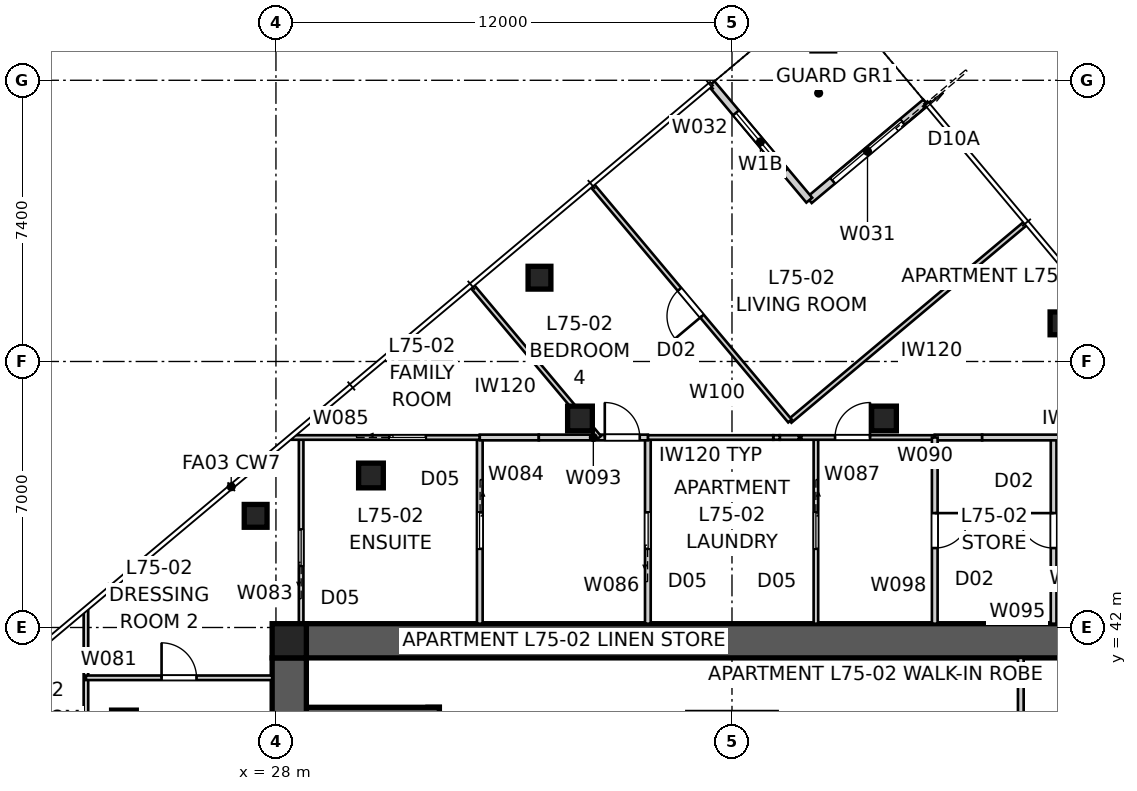
"""IFC4 building model, lengths in metres.
Left out: names, types, materials, properties, quantities, classifications, styles, units other than length and angle.
Written with IfcOpenShell. Run it as: python <this file> out.ifc"""

import sys

from ifc_helpers import new_model, si_unit, direction, frame, frame_2d, origin, origin_2d, place, context, subcontext, project, spatial, polyline, rectangle, outline, extrude, element, fill, save


model = new_model("IFC4")
c1 = context("Model", 3, precision=1e-05, world=origin(), true_north=direction((0.0, 1.0)))
c2 = subcontext(c1, "Body", "Model", "MODEL_VIEW")
j1 = project(units=[si_unit("LENGTHUNIT", "METRE"), si_unit("PLANEANGLEUNIT", "RADIAN")], contexts=[c1])
p1 = place(None, origin())
s1 = spatial("IfcSite", under=j1, at=p1, CompositionType="ELEMENT")
p2 = place(p1, origin())
s2 = spatial("IfcBuilding", under=s1, at=p2, CompositionType="ELEMENT")
p3 = place(p2, frame((0.0, 0.0, 272.6)))
s3 = spatial("IfcBuildingStorey", under=s2, at=p3, CompositionType="ELEMENT", Elevation=272.6)
p4 = place(p3, frame((28.8, 41.65, 0.0), z_axis=(0.0, 0.0, 1.0), x_axis=(1.0, 0.0, 0.0)))
e1 = element("IfcWall", 1, at=p4, inside=s3, PredefinedType="SHEAR", context=c2, shape_type="SweptSolid", body=[
    extrude(outline(polyline([(0.0, -0.45), (22.4, -0.45), (22.4, -0.025), (22.85, -0.025), (22.85, 0.025), (22.4, 0.025), (22.4, 0.45), (0.0, 0.45), (0.0, 0.025), (-0.45, 0.025), (-0.45, -0.025), (0.0, -0.025), (0.0, -0.45)])), origin(), (0.0, 0.0, 1.0), 3.4),
])
p5 = place(p3, frame((28.35, 41.2, 0.0), z_axis=(0.0, 0.0, 1.0), x_axis=(0.0, -1.0, 0.0)))
e2 = element("IfcWall", 2, at=p5, inside=s3, PredefinedType="SHEAR", context=c2, shape_type="SweptSolid", body=[
    extrude(outline(polyline([(0.0, -0.45), (22.4, -0.45), (22.4, -0.025), (22.85, -0.025), (22.85, 0.025), (22.4, 0.025), (22.4, 0.45), (0.0, 0.45), (0.0, 0.025), (-0.45, 0.025), (-0.45, -0.025), (0.0, -0.025), (0.0, -0.45)])), origin(), (0.0, 0.0, 1.0), 3.4),
])
p6 = place(p5, frame((11.14, 0.0, 0.0)))
e3 = element("IfcOpeningElement", 3, at=p6, cuts=e2, PredefinedType="OPENING", context=c2, shape_type="SweptSolid", body=[
    extrude(rectangle(XDim=1.02, YDim=2.4, at=frame_2d((0.51, 1.2))), frame((0.0, 0.46, 0.0), z_axis=(0.0, -1.0, 0.0), x_axis=(1.0, 0.0, 0.0)), (0.0, 0.0, 1.0), 0.92),
])
p7 = place(p3, frame((32.15, 32.2, 0.0), z_axis=(0.0, 0.0, 1.0), x_axis=(0.0, 1.0, 0.0)))
e4 = element("IfcWall", 4, at=p7, inside=s3, PredefinedType="SHEAR", context=c2, shape_type="SweptSolid", body=[
    extrude(rectangle(XDim=7.7, YDim=0.3, at=frame_2d((3.85, 0.0))), origin(), (0.0, 0.0, 1.0), 3.4),
])
p8 = place(p3, frame((28.8, 39.75, 0.0), z_axis=(0.0, 0.0, 1.0), x_axis=(1.0, 0.0, 0.0)))
e5 = element("IfcWall", 5, at=p8, inside=s3, PredefinedType="SHEAR", context=c2, shape_type="SweptSolid", body=[
    extrude(rectangle(XDim=3.5, YDim=0.3, at=frame_2d((1.75, 0.0))), origin(), (0.0, 0.0, 1.0), 3.4),
])
p9 = place(p3, frame((38.8, 39.7, 0.0), z_axis=(0.0, 0.0, 1.0), x_axis=(1.0, 0.0, 0.0)))
e6 = element("IfcWall", 6, at=p9, inside=s3, PredefinedType="SOLIDWALL", context=c2, shape_type="SweptSolid", body=[
    extrude(rectangle(XDim=2.4, YDim=0.2, at=frame_2d((1.2, 0.0))), origin(), (0.0, 0.0, 1.0), 3.4),
])
p10 = place(p3, frame((28.35, 41.65, 0.0), z_axis=(0.0, 0.0, 1.0), x_axis=(1.0, 0.0, 0.0)))
e7 = element("IfcColumn", 7, at=p10, inside=s3, PredefinedType="COLUMN", context=c2, shape_type="SweptSolid", body=[
    extrude(rectangle(XDim=0.9, YDim=0.9, at=origin_2d()), origin(), (0.0, 0.0, 1.0), 3.4),
])
for number, where, z_axis, x_axis in (
    (8, (48.671, 50.003, -0.15), (0.0, 0.0, 1.0), (1.0, 0.0, 0.0)),
    (9, (34.935, 51.205, -0.15), (0.0, 0.0, 1.0), (1.0, 0.0, 0.0)),
    (10, (27.466, 44.938, -0.15), (0.0, 0.0, 1.0), (1.0, 0.0, 0.0)),
):
    element("IfcColumn", number, at=place(p3, frame(where, z_axis=z_axis, x_axis=x_axis)), inside=s3, PredefinedType="COLUMN", context=c2, shape_type="SweptSolid", body=[
        extrude(rectangle(XDim=0.6, YDim=0.6, at=origin_2d()), origin(), (0.0, 0.0, 1.0), 3.55),
    ])
for number, where, z_axis, x_axis in (
    (11, (44.0, 47.5, 0.0), (0.0, 0.0, 1.0), (1.0, 0.0, 0.0)),
    (12, (36.0, 47.5, 0.0), (0.0, 0.0, 1.0), (1.0, 0.0, 0.0)),
    (13, (30.5, 46.0, 0.0), (0.0, 0.0, 1.0), (1.0, 0.0, 0.0)),
    (14, (24.0, 39.5, 0.0), (0.0, 0.0, 1.0), (1.0, 0.0, 0.0)),
):
    element("IfcColumn", number, at=place(p3, frame(where, z_axis=z_axis, x_axis=x_axis)), inside=s3, PredefinedType="COLUMN", context=c2, shape_type="SweptSolid", body=[
        extrude(rectangle(XDim=0.65, YDim=0.65, at=origin_2d()), origin(), (0.0, 0.0, 1.0), 3.4),
    ])
p11 = place(p3, frame((45.098, 55.817, 0.0), z_axis=(0.0, 0.0, 1.0), x_axis=(-0.766060656284, -0.642768287094, 0.0)))
e15 = element("IfcWall", 15, at=p11, inside=s3, PredefinedType="SOLIDWALL", context=c2, shape_type="SweptSolid", body=[
    extrude(rectangle(XDim=4.0, YDim=0.2, at=frame_2d((2.0, 0.0))), origin(), (0.0, 0.0, 1.0), 3.25),
])
p12 = place(p11, frame((0.8, 0.0, 0.0)))
e16 = element("IfcOpeningElement", 16, at=p12, cuts=e15, PredefinedType="OPENING", context=c2, shape_type="SweptSolid", body=[
    extrude(rectangle(XDim=2.4, YDim=2.1, at=frame_2d((1.2, 1.05))), frame((0.0, 0.11, 0.0), z_axis=(0.0, -1.0, 0.0), x_axis=(1.0, 0.0, 0.0)), (0.0, 0.0, 1.0), 0.22),
])
p13 = place(p3, frame((42.034, 53.246, 0.0), z_axis=(0.0, 0.0, 1.0), x_axis=(-0.642798342015, 0.766035437498, 0.0)))
e17 = element("IfcWall", 17, at=p13, inside=s3, PredefinedType="SOLIDWALL", context=c2, shape_type="SweptSolid", body=[
    extrude(rectangle(XDim=4.0, YDim=0.2, at=frame_2d((2.0, 0.0))), origin(), (0.0, 0.0, 1.0), 3.25),
])
p14 = place(p13, frame((1.0, 0.0, 0.45)))
e18 = element("IfcOpeningElement", 18, at=p14, cuts=e17, PredefinedType="OPENING", context=c2, shape_type="SweptSolid", body=[
    extrude(rectangle(XDim=2.0, YDim=1.8, at=frame_2d((1.0, 0.9))), frame((0.0, 0.11, 0.0), z_axis=(0.0, -1.0, 0.0), x_axis=(1.0, 0.0, 0.0)), (0.0, 0.0, 1.0), 0.22),
])
p15 = place(p3, frame((47.6, 41.2, 0.0), z_axis=(0.0, 0.0, 1.0), x_axis=(0.0, -1.0, 0.0)))
e19 = element("IfcWall", 19, at=p15, inside=s3, PredefinedType="SOLIDWALL", context=c2, shape_type="SweptSolid", body=[
    extrude(rectangle(XDim=5.9, YDim=0.15, at=frame_2d((2.95, 0.0))), origin(), (0.0, 0.0, 1.0), 3.25),
])
p16 = place(p3, frame((23.0, 31.824, 0.0), z_axis=(0.0, 0.0, 1.0), x_axis=(0.0, 1.0, 0.0)))
e20 = element("IfcWall", 20, at=p16, inside=s3, PredefinedType="PARTITIONING", context=c2, shape_type="SweptSolid", body=[
    extrude(rectangle(XDim=10.619, YDim=0.12, at=frame_2d((5.31, 0.0))), origin(), (0.0, 0.0, 1.0), 2.55),
])
p17 = place(p16, frame((0.844, 0.0, 0.0)))
e21 = element("IfcOpeningElement", 21, at=p17, cuts=e20, PredefinedType="OPENING", context=c2, shape_type="SweptSolid", body=[
    extrude(rectangle(XDim=0.92, YDim=2.34, at=frame_2d((0.46, 1.17))), frame((0.0, 0.07, 0.0), z_axis=(0.0, -1.0, 0.0), x_axis=(1.0, 0.0, 0.0)), (0.0, 0.0, 1.0), 0.14),
])
p18 = place(p3, frame((23.0, 40.676, 0.0), z_axis=(0.0, 0.0, 1.0), x_axis=(1.0, 0.0, 0.0)))
e22 = element("IfcWall", 22, at=p18, inside=s3, PredefinedType="PARTITIONING", context=c2, shape_type="SweptSolid", body=[
    extrude(rectangle(XDim=4.9, YDim=0.12, at=frame_2d((2.45, 0.0))), origin(), (0.0, 0.0, 1.0), 3.25),
])
p19 = place(p18, frame((1.99, 0.0, 0.0)))
e23 = element("IfcOpeningElement", 23, at=p19, cuts=e22, PredefinedType="OPENING", context=c2, shape_type="SweptSolid", body=[
    extrude(rectangle(XDim=0.92, YDim=2.1, at=frame_2d((0.46, 1.05))), frame((0.0, 0.07, 0.0), z_axis=(0.0, -1.0, 0.0), x_axis=(1.0, 0.0, 0.0)), (0.0, 0.0, 1.0), 0.14),
])
p20 = place(p3, frame((28.663, 41.18, 0.0), z_axis=(0.0, 0.0, 1.0), x_axis=(0.0, 1.0, 0.0)))
e24 = element("IfcWall", 24, at=p20, inside=s3, PredefinedType="PARTITIONING", context=c2, shape_type="SweptSolid", body=[
    extrude(rectangle(XDim=5.82, YDim=0.12, at=frame_2d((2.91, 0.0))), origin(), (0.0, 0.0, 1.0), 3.25),
])
p21 = place(p20, frame((2.44, 0.0, 0.0)))
e25 = element("IfcOpeningElement", 25, at=p21, cuts=e24, PredefinedType="OPENING", context=c2, shape_type="SweptSolid", body=[
    extrude(rectangle(XDim=0.96, YDim=2.1, at=frame_2d((0.48, 1.05))), frame((0.0, 0.07, 0.0), z_axis=(0.0, -1.0, 0.0), x_axis=(1.0, 0.0, 0.0)), (0.0, 0.0, 1.0), 0.14),
])
p22 = place(p3, frame((33.364, 47.0, 0.0), z_axis=(0.0, 0.0, 1.0), x_axis=(0.0, -1.0, 0.0)))
e26 = element("IfcWall", 26, at=p22, inside=s3, PredefinedType="SOLIDWALL", context=c2, shape_type="SweptSolid", body=[
    extrude(rectangle(XDim=4.9, YDim=0.15, at=frame_2d((2.45, 0.0))), origin(), (0.0, 0.0, 1.0), 3.25),
])
p23 = place(p22, frame((1.97, 0.0, 0.0)))
e27 = element("IfcOpeningElement", 27, at=p23, cuts=e26, PredefinedType="OPENING", context=c2, shape_type="SweptSolid", body=[
    extrude(rectangle(XDim=0.96, YDim=2.1, at=frame_2d((0.48, 1.05))), frame((0.0, 0.085, 0.0), z_axis=(0.0, -1.0, 0.0), x_axis=(1.0, 0.0, 0.0)), (0.0, 0.0, 1.0), 0.17),
])
p24 = place(p3, frame((28.43, 47.0, 0.0), z_axis=(0.0, 0.0, 1.0), x_axis=(1.0, 0.0, 0.0)))
e28 = element("IfcWall", 28, at=p24, inside=s3, PredefinedType="PARTITIONING", context=c2, shape_type="SweptSolid", body=[
    extrude(rectangle(XDim=4.934, YDim=0.12, at=frame_2d((2.467, 0.0))), origin(), (0.0, 0.0, 1.0), 3.25),
])
p25 = place(p24, frame((2.553, 0.0, 0.0)))
e29 = element("IfcOpeningElement", 29, at=p25, cuts=e28, PredefinedType="OPENING", context=c2, shape_type="SweptSolid", body=[
    extrude(rectangle(XDim=0.96, YDim=2.1, at=frame_2d((0.48, 1.05))), frame((0.0, 0.07, 0.0), z_axis=(0.0, -1.0, 0.0), x_axis=(1.0, 0.0, 0.0)), (0.0, 0.0, 1.0), 0.14),
])
p26 = place(p3, frame((37.786, 42.1, 0.0), z_axis=(0.0, 0.0, 1.0), x_axis=(0.0, 1.0, 0.0)))
e30 = element("IfcWall", 30, at=p26, inside=s3, PredefinedType="SOLIDWALL", context=c2, shape_type="SweptSolid", body=[
    extrude(rectangle(XDim=4.9, YDim=0.15, at=frame_2d((2.45, 0.0))), origin(), (0.0, 0.0, 1.0), 3.25),
])
p27 = place(p26, frame((1.97, 0.0, 0.0)))
e31 = element("IfcOpeningElement", 31, at=p27, cuts=e30, PredefinedType="OPENING", context=c2, shape_type="SweptSolid", body=[
    extrude(rectangle(XDim=0.96, YDim=2.1, at=frame_2d((0.48, 1.05))), frame((0.0, 0.085, 0.0), z_axis=(0.0, -1.0, 0.0), x_axis=(1.0, 0.0, 0.0)), (0.0, 0.0, 1.0), 0.17),
])
p28 = place(p3, frame((42.208, 47.0, 0.0), z_axis=(0.0, 0.0, 1.0), x_axis=(0.0, -1.0, 0.0)))
e32 = element("IfcWall", 32, at=p28, inside=s3, PredefinedType="PARTITIONING", context=c2, shape_type="SweptSolid", body=[
    extrude(rectangle(XDim=4.9, YDim=0.12, at=frame_2d((2.45, 0.0))), origin(), (0.0, 0.0, 1.0), 3.25),
])
p29 = place(p28, frame((1.97, 0.0, 0.0)))
e33 = element("IfcOpeningElement", 33, at=p29, cuts=e32, PredefinedType="OPENING", context=c2, shape_type="SweptSolid", body=[
    extrude(rectangle(XDim=0.96, YDim=2.1, at=frame_2d((0.48, 1.05))), frame((0.0, 0.07, 0.0), z_axis=(0.0, -1.0, 0.0), x_axis=(1.0, 0.0, 0.0)), (0.0, 0.0, 1.0), 0.14),
])
p30 = place(p3, frame((41.258, 47.0, 0.0), z_axis=(0.0, 0.0, 1.0), x_axis=(1.0, 0.0, 0.0)))
e34 = element("IfcWall", 34, at=p30, inside=s3, PredefinedType="PARTITIONING", context=c2, shape_type="SweptSolid", body=[
    extrude(rectangle(XDim=0.504, YDim=0.12, at=frame_2d((0.252, 0.0))), origin(), (0.0, 0.0, 1.0), 3.25),
])
p31 = place(p3, frame((41.824, 47.0, 0.0), z_axis=(0.0, 0.0, 1.0), x_axis=(1.0, 0.0, 0.0)))
e35 = element("IfcWall", 35, at=p31, inside=s3, PredefinedType="PARTITIONING", context=c2, shape_type="SweptSolid", body=[
    extrude(rectangle(XDim=3.511, YDim=0.12, at=frame_2d((1.756, 0.0))), origin(), (0.0, 0.0, 1.0), 3.25),
])
p32 = place(p31, frame((0.887, 0.0, 0.0)))
e36 = element("IfcOpeningElement", 36, at=p32, cuts=e35, PredefinedType="OPENING", context=c2, shape_type="SweptSolid", body=[
    extrude(rectangle(XDim=0.92, YDim=2.34, at=frame_2d((0.46, 1.17))), frame((0.0, 0.07, 0.0), z_axis=(0.0, -1.0, 0.0), x_axis=(1.0, 0.0, 0.0)), (0.0, 0.0, 1.0), 0.14),
])
p33 = place(p3, frame((37.786, 47.0, 0.0), z_axis=(0.0, 0.0, 1.0), x_axis=(1.0, 0.0, 0.0)))
e37 = element("IfcWall", 37, at=p33, inside=s3, PredefinedType="PARTITIONING", context=c2, shape_type="SweptSolid", body=[
    extrude(rectangle(XDim=3.299, YDim=0.12, at=frame_2d((1.65, 0.0))), origin(), (0.0, 0.0, 1.0), 3.25),
])
p34 = place(p3, frame((33.364, 47.0, 0.0), z_axis=(0.0, 0.0, 1.0), x_axis=(1.0, 0.0, 0.0)))
e38 = element("IfcWall", 38, at=p34, inside=s3, PredefinedType="SOLIDWALL", context=c2, shape_type="SweptSolid", body=[
    extrude(rectangle(XDim=1.553, YDim=0.15, at=frame_2d((0.776, 0.0))), origin(), (0.0, 0.0, 1.0), 2.55),
])
p35 = place(p3, frame((34.917, 47.0, 0.0), z_axis=(0.0, 0.0, 1.0), x_axis=(1.0, 0.0, 0.0)))
e39 = element("IfcWall", 39, at=p35, inside=s3, PredefinedType="SOLIDWALL", context=c2, shape_type="SweptSolid", body=[
    extrude(rectangle(XDim=2.869, YDim=0.15, at=frame_2d((1.435, 0.0))), origin(), (0.0, 0.0, 1.0), 3.25),
])
p36 = place(p35, frame((1.736, 0.0, 0.0)))
e40 = element("IfcOpeningElement", 40, at=p36, cuts=e39, PredefinedType="OPENING", context=c2, shape_type="SweptSolid", body=[
    extrude(rectangle(XDim=0.92, YDim=2.34, at=frame_2d((0.46, 1.17))), frame((0.0, 0.085, 0.0), z_axis=(0.0, -1.0, 0.0), x_axis=(1.0, 0.0, 0.0)), (0.0, 0.0, 1.0), 0.17),
])
p37 = place(p3, frame((48.463, 42.1, 0.0), z_axis=(0.0, 0.0, 1.0), x_axis=(0.0, 1.0, 0.0)))
e41 = element("IfcWall", 41, at=p37, inside=s3, PredefinedType="SOLIDWALL", context=c2, shape_type="SweptSolid", body=[
    extrude(rectangle(XDim=4.9, YDim=0.15, at=frame_2d((2.45, 0.0))), origin(), (0.0, 0.0, 1.0), 3.25),
])
p38 = place(p37, frame((1.99, 0.0, 0.0)))
e42 = element("IfcOpeningElement", 42, at=p38, cuts=e41, PredefinedType="OPENING", context=c2, shape_type="SweptSolid", body=[
    extrude(rectangle(XDim=0.92, YDim=2.34, at=frame_2d((0.46, 1.17))), frame((0.0, 0.085, 0.0), z_axis=(0.0, -1.0, 0.0), x_axis=(1.0, 0.0, 0.0)), (0.0, 0.0, 1.0), 0.17),
])
p39 = place(p3, frame((45.336, 47.0, 0.0), z_axis=(0.0, 0.0, 1.0), x_axis=(1.0, 0.0, 0.0)))
e43 = element("IfcWall", 43, at=p39, inside=s3, PredefinedType="SOLIDWALL", context=c2, shape_type="SweptSolid", body=[
    extrude(rectangle(XDim=1.248, YDim=0.15, at=frame_2d((0.624, 0.0))), origin(), (0.0, 0.0, 1.0), 2.55),
])
p40 = place(p3, frame((46.583, 47.0, 0.0), z_axis=(0.0, 0.0, 1.0), x_axis=(1.0, 0.0, 0.0)))
e44 = element("IfcWall", 44, at=p40, inside=s3, PredefinedType="SOLIDWALL", context=c2, shape_type="SweptSolid", body=[
    extrude(rectangle(XDim=5.86, YDim=0.15, at=frame_2d((2.93, 0.0))), origin(), (0.0, 0.0, 1.0), 3.25),
])
p41 = place(p3, frame((45.336, 47.0, 0.0), z_axis=(0.0, 0.0, 1.0), x_axis=(0.0, -1.0, 0.0)))
e45 = element("IfcWall", 45, at=p41, inside=s3, PredefinedType="SOLIDWALL", context=c2, shape_type="SweptSolid", body=[
    extrude(rectangle(XDim=4.9, YDim=0.15, at=frame_2d((2.45, 0.0))), origin(), (0.0, 0.0, 1.0), 3.25),
])
p42 = place(p41, frame((1.99, 0.0, 0.0)))
e46 = element("IfcOpeningElement", 46, at=p42, cuts=e45, PredefinedType="OPENING", context=c2, shape_type="SweptSolid", body=[
    extrude(rectangle(XDim=0.92, YDim=2.34, at=frame_2d((0.46, 1.17))), frame((0.0, 0.085, 0.0), z_axis=(0.0, -1.0, 0.0), x_axis=(1.0, 0.0, 0.0)), (0.0, 0.0, 1.0), 0.17),
])
p43 = place(p3, frame((47.719, 52.631, 0.0), z_axis=(0.0, 0.0, 1.0), x_axis=(-0.766033729027, -0.642800378028, 0.0)))
e47 = element("IfcWall", 47, at=p43, inside=s3, PredefinedType="PARTITIONING", context=c2, shape_type="SweptSolid", body=[
    extrude(rectangle(XDim=8.085, YDim=0.12, at=frame_2d((4.042, 0.0))), origin(), (0.0, 0.0, 1.0), 3.25),
])
p44 = place(p3, frame((41.525, 47.434, 0.0), z_axis=(0.0, 0.0, 1.0), x_axis=(-0.642800378028, 0.766033729027, 0.0)))
e48 = element("IfcWall", 48, at=p44, inside=s3, PredefinedType="PARTITIONING", context=c2, shape_type="SweptSolid", body=[
    extrude(rectangle(XDim=8.085, YDim=0.12, at=frame_2d((4.042, 0.0))), origin(), (0.0, 0.0, 1.0), 3.25),
])
p45 = place(p44, frame((3.603, 0.0, 0.0)))
e49 = element("IfcOpeningElement", 49, at=p45, cuts=e48, PredefinedType="OPENING", context=c2, shape_type="SweptSolid", body=[
    extrude(rectangle(XDim=0.92, YDim=2.34, at=frame_2d((0.46, 1.17))), frame((0.0, 0.07, 0.0), z_axis=(0.0, -1.0, 0.0), x_axis=(1.0, 0.0, 0.0)), (0.0, 0.0, 1.0), 0.14),
])
p46 = place(p3, frame((36.505, 47.0, 0.0), z_axis=(0.0, 0.0, 1.0), x_axis=(-0.642776136034, 0.76605407051, 0.0)))
e50 = element("IfcWall", 50, at=p46, inside=s3, PredefinedType="PARTITIONING", context=c2, shape_type="SweptSolid", body=[
    extrude(rectangle(XDim=5.191, YDim=0.12, at=frame_2d((2.595, 0.0))), origin(), (0.0, 0.0, 1.0), 3.25),
])
p47 = place(p3, frame((41.258, 47.0, 0.0), z_axis=(0.0, 0.0, 1.0), x_axis=(-1.0, 0.0, 0.0)))
e51 = element("IfcWall", 51, at=p47, inside=s3, PredefinedType="PARTITIONING", context=c2, shape_type="SweptSolid", body=[
    extrude(rectangle(XDim=0.172, YDim=0.12, at=frame_2d((0.086, 0.0))), origin(), (0.0, 0.0, 1.0), 3.25),
])
p48 = place(p12, origin())
e52 = element("IfcDoor", 52, at=p48, inside=s3, OperationType="SLIDING_TO_LEFT", PredefinedType="DOOR", context=c2, shape_type="SweptSolid", body=[
    extrude(rectangle(XDim=2.4, YDim=2.1, at=frame_2d((1.2, 1.05))), frame((0.0, 0.025, 0.0), z_axis=(0.0, -1.0, 0.0), x_axis=(1.0, 0.0, 0.0)), (0.0, 0.0, 1.0), 0.05),
])
fill(e16, e52)
p49 = place(p14, origin())
e53 = element("IfcWindow", 53, at=p49, inside=s3, PartitioningType="SINGLE_PANEL", PredefinedType="WINDOW", context=c2, shape_type="SweptSolid", body=[
    extrude(rectangle(XDim=2.0, YDim=1.8, at=frame_2d((1.0, 0.9))), frame((0.0, 0.03, 0.0), z_axis=(0.0, -1.0, 0.0), x_axis=(1.0, 0.0, 0.0)), (0.0, 0.0, 1.0), 0.06),
])
fill(e18, e53)
p50 = place(p19, origin())
e54 = element("IfcDoor", 54, at=p50, inside=s3, OperationType="SINGLE_SWING_LEFT", PredefinedType="DOOR", context=c2, shape_type="SweptSolid", body=[
    extrude(rectangle(XDim=0.92, YDim=2.1, at=frame_2d((0.46, 1.05))), frame((0.0, 0.025, 0.0), z_axis=(0.0, -1.0, 0.0), x_axis=(1.0, 0.0, 0.0)), (0.0, 0.0, 1.0), 0.05),
])
fill(e23, e54)
p51 = place(p21, origin())
e55 = element("IfcDoor", 55, at=p51, inside=s3, OperationType="SLIDING_TO_LEFT", PredefinedType="DOOR", context=c2, shape_type="SweptSolid", body=[
    extrude(rectangle(XDim=0.96, YDim=2.1, at=frame_2d((0.48, 1.05))), frame((0.0, 0.025, 0.0), z_axis=(0.0, -1.0, 0.0), x_axis=(1.0, 0.0, 0.0)), (0.0, 0.0, 1.0), 0.05),
])
fill(e25, e55)
p52 = place(p23, origin())
e56 = element("IfcDoor", 56, at=p52, inside=s3, OperationType="SLIDING_TO_LEFT", PredefinedType="DOOR", context=c2, shape_type="SweptSolid", body=[
    extrude(rectangle(XDim=0.96, YDim=2.1, at=frame_2d((0.48, 1.05))), frame((0.0, 0.025, 0.0), z_axis=(0.0, -1.0, 0.0), x_axis=(1.0, 0.0, 0.0)), (0.0, 0.0, 1.0), 0.05),
])
fill(e27, e56)
p53 = place(p25, origin())
e57 = element("IfcDoor", 57, at=p53, inside=s3, OperationType="SLIDING_TO_LEFT", PredefinedType="DOOR", context=c2, shape_type="SweptSolid", body=[
    extrude(rectangle(XDim=0.96, YDim=2.1, at=frame_2d((0.48, 1.05))), frame((0.0, 0.025, 0.0), z_axis=(0.0, -1.0, 0.0), x_axis=(1.0, 0.0, 0.0)), (0.0, 0.0, 1.0), 0.05),
])
fill(e29, e57)
p54 = place(p27, origin())
e58 = element("IfcDoor", 58, at=p54, inside=s3, OperationType="SLIDING_TO_LEFT", PredefinedType="DOOR", context=c2, shape_type="SweptSolid", body=[
    extrude(rectangle(XDim=0.96, YDim=2.1, at=frame_2d((0.48, 1.05))), frame((0.0, 0.025, 0.0), z_axis=(0.0, -1.0, 0.0), x_axis=(1.0, 0.0, 0.0)), (0.0, 0.0, 1.0), 0.05),
])
fill(e31, e58)
p55 = place(p36, origin())
e59 = element("IfcDoor", 59, at=p55, inside=s3, OperationType="SINGLE_SWING_LEFT", PredefinedType="DOOR", context=c2, shape_type="SweptSolid", body=[
    extrude(rectangle(XDim=0.92, YDim=2.34, at=frame_2d((0.46, 1.17))), frame((0.0, 0.025, 0.0), z_axis=(0.0, -1.0, 0.0), x_axis=(1.0, 0.0, 0.0)), (0.0, 0.0, 1.0), 0.05),
])
fill(e40, e59)
p56 = place(p29, origin())
e60 = element("IfcDoor", 60, at=p56, inside=s3, OperationType="SLIDING_TO_LEFT", PredefinedType="DOOR", context=c2, shape_type="SweptSolid", body=[
    extrude(rectangle(XDim=0.96, YDim=2.1, at=frame_2d((0.48, 1.05))), frame((0.0, 0.025, 0.0), z_axis=(0.0, -1.0, 0.0), x_axis=(1.0, 0.0, 0.0)), (0.0, 0.0, 1.0), 0.05),
])
fill(e33, e60)
p57 = place(p42, origin())
e61 = element("IfcDoor", 61, at=p57, inside=s3, OperationType="SINGLE_SWING_LEFT", PredefinedType="DOOR", context=c2, shape_type="SweptSolid", body=[
    extrude(rectangle(XDim=0.92, YDim=2.34, at=frame_2d((0.46, 1.17))), frame((0.0, 0.025, 0.0), z_axis=(0.0, -1.0, 0.0), x_axis=(1.0, 0.0, 0.0)), (0.0, 0.0, 1.0), 0.05),
])
fill(e46, e61)
p58 = place(p32, origin())
e62 = element("IfcDoor", 62, at=p58, inside=s3, OperationType="SINGLE_SWING_RIGHT", PredefinedType="DOOR", context=c2, shape_type="SweptSolid", body=[
    extrude(rectangle(XDim=0.92, YDim=2.34, at=frame_2d((0.46, 1.17))), frame((0.0, 0.025, 0.0), z_axis=(0.0, -1.0, 0.0), x_axis=(1.0, 0.0, 0.0)), (0.0, 0.0, 1.0), 0.05),
])
fill(e36, e62)
p59 = place(p38, origin())
e63 = element("IfcDoor", 63, at=p59, inside=s3, OperationType="SINGLE_SWING_RIGHT", PredefinedType="DOOR", context=c2, shape_type="SweptSolid", body=[
    extrude(rectangle(XDim=0.92, YDim=2.34, at=frame_2d((0.46, 1.17))), frame((0.0, 0.025, 0.0), z_axis=(0.0, -1.0, 0.0), x_axis=(1.0, 0.0, 0.0)), (0.0, 0.0, 1.0), 0.05),
])
fill(e42, e63)
p60 = place(p45, origin())
e64 = element("IfcDoor", 64, at=p60, inside=s3, OperationType="SINGLE_SWING_LEFT", PredefinedType="DOOR", context=c2, shape_type="SweptSolid", body=[
    extrude(rectangle(XDim=0.92, YDim=2.34, at=frame_2d((0.46, 1.17))), frame((0.0, 0.025, 0.0), z_axis=(0.0, -1.0, 0.0), x_axis=(1.0, 0.0, 0.0)), (0.0, 0.0, 1.0), 0.05),
])
fill(e49, e64)
save(model, sys.argv[1])
